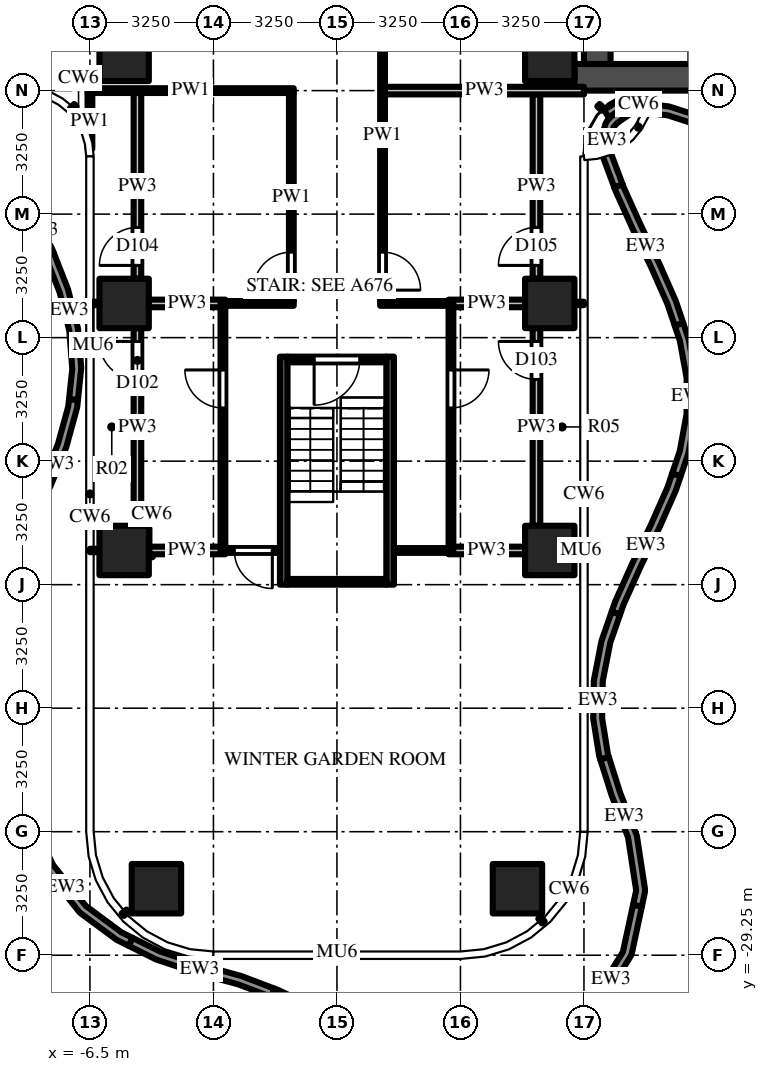
"""IFC4 building model, lengths in metres.
Left out: names, types, materials, properties, quantities, classifications, styles, units other than length and angle.
Written with IfcOpenShell. Run it as: python <this file> out.ifc"""

import sys

from ifc_helpers import new_model, si_unit, direction, frame, frame_2d, origin, origin_2d, place, context, subcontext, project, spatial, polyline, rectangle, outline, extrude, source, transform, mapped, element, fill, save


model = new_model("IFC4")
c1 = context("Model", 3, precision=1e-05, world=origin(), true_north=direction((0.0, 1.0)))
c2 = subcontext(c1, "Body", "Model", "MODEL_VIEW")
j1 = project(units=[si_unit("LENGTHUNIT", "METRE"), si_unit("PLANEANGLEUNIT", "RADIAN")], contexts=[c1])
p1 = place(None, origin())
s1 = spatial("IfcSite", under=j1, at=p1, CompositionType="ELEMENT")
p2 = place(p1, origin())
s2 = spatial("IfcBuilding", under=s1, at=p2, CompositionType="ELEMENT")
p3 = place(p2, frame((0.0, 0.0, 92.5)))
s3 = spatial("IfcBuildingStorey", under=s2, at=p3, CompositionType="ELEMENT", Elevation=92.5)
m1 = source(origin(), c2, "Body", "SweptSolid", [
    extrude(rectangle(XDim=1.3, YDim=1.3, at=origin_2d()), origin(), (0.0, 0.0, 1.0), 5.0),
])
for number, where, z_axis, x_axis in (
    (1, (5.6, -5.6, 0.0), (0.0, 0.0, 1.0), (1.0, 0.0, 0.0)),
    (2, (-5.6, -5.6, 0.0), (0.0, 0.0, 1.0), (1.0, 0.0, 0.0)),
    (3, (5.6, -12.1, 0.0), (0.0, 0.0, 1.0), (1.0, 0.0, 0.0)),
    (4, (5.6, -18.6, 0.0), (0.0, 0.0, 1.0), (1.0, 0.0, 0.0)),
    (5, (4.75, -27.5, 0.0), (0.0, 0.0, 1.0), (1.0, 0.0, 0.0)),
    (6, (-5.6, -12.1, 0.0), (0.0, 0.0, 1.0), (1.0, 0.0, 0.0)),
    (7, (-5.6, -18.6, 0.0), (0.0, 0.0, 1.0), (1.0, 0.0, 0.0)),
    (8, (-4.75, -27.5, 0.0), (0.0, 0.0, 1.0), (1.0, 0.0, 0.0)),
):
    element("IfcColumn", number, at=place(p3, frame(where, z_axis=z_axis, x_axis=x_axis)), inside=s3, PredefinedType="COLUMN", context=c2, shape_type="MappedRepresentation", body=[
        mapped(m1, transform((0.0, 0.0, 0.0))),
    ])
m2 = source(origin(), c2, "Body", "SweptSolid", [
    extrude(rectangle(XDim=16.5, YDim=0.7, at=frame_2d((8.25, 0.0))), origin(), (0.0, 0.0, 1.0), 4.75),
])
p4 = place(p3, frame((6.25, -6.15, 0.0), z_axis=(0.0, 0.0, 1.0), x_axis=(1.0, 0.0, 0.0)))
e9 = element("IfcWall", 9, at=p4, inside=s3, PredefinedType="SHEAR", context=c2, shape_type="MappedRepresentation", body=[
    mapped(m2, transform((0.0, 0.0, 0.0))),
])
m3 = source(origin(), c2, "Body", "SweptSolid", [
    extrude(rectangle(XDim=9.05, YDim=0.7, at=frame_2d((4.525, 0.0))), origin(), (0.0, 0.0, 1.0), 4.75),
])
p5 = place(p3, frame((6.85, -5.8, 0.0), z_axis=(0.0, 0.0, 1.0), x_axis=(0.0, 1.0, 0.0)))
e10 = element("IfcWall", 10, at=p5, inside=s3, PredefinedType="SHEAR", context=c2, shape_type="MappedRepresentation", body=[
    mapped(m3, transform((0.0, 0.0, 0.0))),
])
m4 = source(origin(), c2, "Body", "SweptSolid", [
    extrude(rectangle(XDim=1.8, YDim=2.1, at=frame_2d((0.9, 1.05))), frame((0.0, 0.36, 0.0), z_axis=(0.0, -1.0, 0.0), x_axis=(1.0, 0.0, 0.0)), (0.0, 0.0, 1.0), 0.72),
])
p6 = place(p5, frame((3.15, 0.0, 0.0)))
e11 = element("IfcOpeningElement", 11, at=p6, cuts=e10, PredefinedType="OPENING", context=c2, shape_type="MappedRepresentation", body=[
    mapped(m4, transform((0.0, 0.0, 0.0))),
])
m5 = source(origin(), c2, "Body", "SweptSolid", [
    extrude(rectangle(XDim=6.0, YDim=0.2, at=frame_2d((3.0, 0.0))), origin(), (0.0, 0.0, 1.0), 4.75),
])
for number, where, z_axis, x_axis in (
    (12, (1.4, -13.5, 0.0), (0.0, 0.0, 1.0), (0.0, -1.0, 0.0)),
    (13, (-1.4, -13.5, 0.0), (0.0, 0.0, 1.0), (0.0, -1.0, 0.0)),
):
    element("IfcWall", number, at=place(p3, frame(where, z_axis=z_axis, x_axis=x_axis)), inside=s3, PredefinedType="SHEAR", context=c2, shape_type="MappedRepresentation", body=[
        mapped(m5, transform((0.0, 0.0, 0.0))),
    ])
m6 = source(origin(), c2, "Body", "SweptSolid", [
    extrude(rectangle(XDim=2.6, YDim=0.15, at=frame_2d((1.3, 0.0))), origin(), (0.0, 0.0, 1.0), 4.75),
])
p7 = place(p3, frame((1.3, -13.575, 0.0), z_axis=(0.0, 0.0, 1.0), x_axis=(-1.0, 0.0, 0.0)))
e14 = element("IfcWall", 14, at=p7, inside=s3, PredefinedType="SHEAR", context=c2, shape_type="MappedRepresentation", body=[
    mapped(m6, transform((0.0, 0.0, 0.0))),
])
m7 = source(origin(), c2, "Body", "SweptSolid", [
    extrude(rectangle(XDim=1.2, YDim=2.1, at=frame_2d((0.6, 1.05))), frame((0.0, 0.085, 0.0), z_axis=(0.0, -1.0, 0.0), x_axis=(1.0, 0.0, 0.0)), (0.0, 0.0, 1.0), 0.17),
])
p8 = place(p7, frame((0.7, 0.0, 0.0)))
e15 = element("IfcOpeningElement", 15, at=p8, cuts=e14, PredefinedType="OPENING", context=c2, shape_type="MappedRepresentation", body=[
    mapped(m7, transform((0.0, 0.0, 0.0))),
])
p9 = place(p3, frame((1.3, -19.425, 0.0), z_axis=(0.0, 0.0, 1.0), x_axis=(-1.0, 0.0, 0.0)))
e16 = element("IfcWall", 16, at=p9, inside=s3, PredefinedType="SHEAR", context=c2, shape_type="MappedRepresentation", body=[
    mapped(m6, transform((0.0, 0.0, 0.0))),
])
p10 = place(p3, origin())
e17 = element("IfcWall", 17, at=p10, inside=s3, PredefinedType="PARAPET", context=c2, shape_type="SweptSolid", body=[
    extrude(outline(polyline([(11.142, -8.126), (10.659, -7.894), (9.688, -7.471), (8.714, -7.153), (7.941, -7.061), (7.857, -7.083), (7.72, -6.873), (7.906, -6.828), (7.974, -6.823), (8.741, -6.918), (9.76, -7.247), (10.755, -7.679), (11.244, -7.915), (11.142, -8.126)])), origin(), (0.0, 0.0, 1.0), 1.1),
])
e18 = element("IfcWall", 18, at=p10, inside=s3, PredefinedType="PARAPET", context=c2, shape_type="SweptSolid", body=[
    extrude(outline(polyline([(7.857, -7.083), (7.711, -7.122), (7.388, -7.342), (7.301, -7.435), (7.285, -7.461), (7.243, -7.599), (7.207, -8.036), (7.23, -8.201), (7.518, -8.968), (7.298, -9.05), (6.995, -8.231), (6.972, -8.03), (7.01, -7.566), (7.069, -7.365), (7.111, -7.293), (7.226, -7.171), (7.542, -6.953), (7.154, -7.206), (7.025, -7.009), (7.575, -6.65), (7.704, -6.847), (7.604, -6.912), (7.658, -6.888), (7.72, -6.873), (7.857, -7.083)])), origin(), (0.0, 0.0, 1.0), 1.1),
])
e19 = element("IfcWall", 19, at=p10, inside=s3, PredefinedType="PARAPET", context=c2, shape_type="SweptSolid", body=[
    extrude(outline(polyline([(7.518, -8.968), (7.547, -9.044), (7.992, -10.034), (8.473, -11.031), (8.918, -12.038), (9.111, -12.613), (8.889, -12.687), (8.698, -12.118), (8.259, -11.127), (7.78, -10.135), (7.331, -9.137), (7.298, -9.05), (7.518, -8.968)])), origin(), (0.0, 0.0, 1.0), 1.1),
])
e20 = element("IfcWall", 20, at=p10, inside=s3, PredefinedType="PARAPET", context=c2, shape_type="SweptSolid", body=[
    extrude(outline(polyline([(9.111, -12.613), (9.256, -13.045), (9.436, -14.05), (9.432, -15.048), (9.249, -16.04), (9.043, -16.649), (8.821, -16.574), (9.024, -15.973), (9.199, -15.016), (9.201, -14.06), (9.025, -13.09), (8.889, -12.687), (9.111, -12.613)])), origin(), (0.0, 0.0, 1.0), 1.1),
])
e21 = element("IfcWall", 21, at=p10, inside=s3, PredefinedType="PARAPET", context=c2, shape_type="SweptSolid", body=[
    extrude(outline(polyline([(9.043, -16.649), (8.915, -17.03), (8.482, -18.008), (7.996, -19.015), (7.542, -20.024), (7.45, -20.288), (7.229, -20.211), (7.322, -19.941), (7.782, -18.917), (8.268, -17.912), (8.698, -16.939), (8.821, -16.574), (9.043, -16.649)])), origin(), (0.0, 0.0, 1.0), 1.1),
])
e22 = element("IfcWall", 22, at=p10, inside=s3, PredefinedType="PARAPET", context=c2, shape_type="SweptSolid", body=[
    extrude(outline(polyline([(7.45, -20.288), (7.194, -21.022), (6.995, -22.036), (6.979, -23.019), (7.13, -23.958), (7.154, -24.033), (6.931, -24.103), (6.9, -24.004), (6.744, -23.026), (6.76, -22.021), (6.962, -20.978), (7.229, -20.211), (7.45, -20.288)])), origin(), (0.0, 0.0, 1.0), 1.1),
])
e23 = element("IfcWall", 23, at=p10, inside=s3, PredefinedType="PARAPET", context=c2, shape_type="SweptSolid", body=[
    extrude(outline(polyline([(7.154, -24.033), (7.453, -24.976), (7.892, -26.105), (8.106, -27.505), (8.103, -27.597), (8.022, -27.975), (7.792, -27.925), (7.871, -27.558), (7.872, -27.53), (7.659, -26.146), (7.233, -25.058), (6.931, -24.103), (7.154, -24.033)])), origin(), (0.0, 0.0, 1.0), 1.1),
])
e24 = element("IfcWall", 24, at=p10, inside=s3, PredefinedType="PARAPET", context=c2, shape_type="SweptSolid", body=[
    extrude(outline(polyline([(8.022, -27.975), (7.759, -29.205), (7.738, -29.263), (6.872, -30.653), (6.828, -30.705), (5.927, -31.367), (5.788, -31.178), (6.658, -30.541), (6.678, -30.519), (7.524, -29.166), (7.792, -27.925), (8.022, -27.975)])), origin(), (0.0, 0.0, 1.0), 1.1),
])
e25 = element("IfcWall", 25, at=p10, inside=s3, PredefinedType="PARAPET", context=c2, shape_type="SweptSolid", body=[
    extrude(outline(polyline([(1.931, -31.921), (1.389, -31.759), (0.368, -31.327), (-1.634, -30.383), (-1.729, -30.347), (-1.646, -30.127), (-1.546, -30.165), (0.466, -31.113), (1.459, -31.534), (1.999, -31.698), (1.931, -31.921)])), origin(), (0.0, 0.0, 1.0), 1.1),
])
e26 = element("IfcWall", 26, at=p10, inside=s3, PredefinedType="PARAPET", context=c2, shape_type="SweptSolid", body=[
    extrude(outline(polyline([(-1.729, -30.347), (-2.597, -30.018), (-3.685, -29.72), (-4.758, -29.362), (-5.482, -29.002), (-5.379, -28.793), (-4.656, -29.15), (-3.612, -29.496), (-2.519, -29.796), (-1.646, -30.127), (-1.729, -30.347)])), origin(), (0.0, 0.0, 1.0), 1.1),
])
e27 = element("IfcWall", 27, at=p10, inside=s3, PredefinedType="PARAPET", context=c2, shape_type="SweptSolid", body=[
    extrude(outline(polyline([(-5.482, -29.002), (-5.797, -28.846), (-6.753, -28.139), (-6.781, -28.112), (-7.678, -26.982), (-8.16, -25.985), (-7.948, -25.883), (-7.468, -26.875), (-6.607, -27.953), (-5.66, -28.654), (-5.379, -28.793), (-5.482, -29.002)])), origin(), (0.0, 0.0, 1.0), 1.1),
])
e28 = element("IfcWall", 28, at=p10, inside=s3, PredefinedType="PARAPET", context=c2, shape_type="SweptSolid", body=[
    extrude(outline(polyline([(-8.429, -18.239), (-7.738, -16.78), (-7.341, -15.795), (-7.07, -14.81), (-7.049, -14.615), (-6.815, -14.639), (-6.835, -14.833), (-7.12, -15.877), (-7.524, -16.877), (-8.217, -18.34), (-8.429, -18.239)])), origin(), (0.0, 0.0, 1.0), 1.1),
])
e29 = element("IfcWall", 29, at=p10, inside=s3, PredefinedType="PARAPET", context=c2, shape_type="SweptSolid", body=[
    extrude(outline(polyline([(-7.049, -14.615), (-6.964, -13.82), (-7.044, -12.81), (-7.295, -11.815), (-7.667, -10.863), (-7.449, -10.777), (-7.076, -11.728), (-6.813, -12.762), (-6.729, -13.8), (-6.815, -14.639), (-7.049, -14.615)])), origin(), (0.0, 0.0, 1.0), 1.1),
])
e30 = element("IfcWall", 30, at=p10, inside=s3, PredefinedType="PARAPET", context=c2, shape_type="SweptSolid", body=[
    extrude(outline(polyline([(-7.667, -10.863), (-7.699, -10.782), (-8.24, -9.633), (-8.344, -9.506), (-8.373, -9.486), (-8.528, -9.431), (-8.94, -9.388), (-9.936, -9.145), (-10.512, -8.925), (-10.429, -8.705), (-9.859, -8.923), (-8.892, -9.157), (-8.49, -9.198), (-8.444, -9.209), (-8.263, -9.276), (-8.185, -9.331), (-8.06, -9.478), (-8.034, -9.519), (-7.485, -10.685), (-7.449, -10.777), (-7.667, -10.863)])), origin(), (0.0, 0.0, 1.0), 1.1),
])
m8 = source(origin(), c2, "Body", "SweptSolid", [
    extrude(rectangle(XDim=1.469, YDim=0.125, at=frame_2d((0.734, 0.0))), origin(), (0.0, 0.0, 1.0), 4.75),
])
p11 = place(p3, frame((-6.5, -6.562, 0.0), z_axis=(0.0, 0.0, 1.0), x_axis=(0.0, -1.0, 0.0)))
e31 = element("IfcWall", 31, at=p11, inside=s3, PredefinedType="PARTITIONING", context=c2, shape_type="MappedRepresentation", body=[
    mapped(m8, transform((0.0, 0.0, 0.0))),
])
m9 = source(origin(), c2, "Body", "SweptSolid", [
    extrude(rectangle(XDim=5.2, YDim=0.2, at=frame_2d((2.6, 0.0))), origin(), (0.0, 0.0, 1.0), 4.323),
])
p12 = place(p3, frame((-5.25, -17.95, 0.0), z_axis=(0.0, 0.0, 1.0), x_axis=(0.0, 1.0, 0.0)))
e32 = element("IfcWall", 32, at=p12, inside=s3, PredefinedType="PARTITIONING", context=c2, shape_type="MappedRepresentation", body=[
    mapped(m9, transform((0.0, 0.0, 0.0))),
])
m10 = source(origin(), c2, "Body", "SweptSolid", [
    extrude(rectangle(XDim=1.0, YDim=2.1, at=frame_2d((0.5, 1.05))), frame((0.0, 0.11, 0.0), z_axis=(0.0, -1.0, 0.0), x_axis=(1.0, 0.0, 0.0)), (0.0, 0.0, 1.0), 0.22),
])
p13 = place(p12, frame((3.85, 0.0, 0.0)))
e33 = element("IfcOpeningElement", 33, at=p13, cuts=e32, PredefinedType="OPENING", context=c2, shape_type="MappedRepresentation", body=[
    mapped(m10, transform((0.0, 0.0, 0.0))),
])
m11 = source(origin(), c2, "Body", "SweptSolid", [
    extrude(rectangle(XDim=4.887, YDim=0.2, at=frame_2d((2.444, 0.0))), origin(), (0.0, 0.0, 1.0), 4.046),
])
p14 = place(p3, frame((-5.25, -11.45, 0.0), z_axis=(0.0, 0.0, 1.0), x_axis=(0.0, 1.0, 0.0)))
e34 = element("IfcWall", 34, at=p14, inside=s3, PredefinedType="PARTITIONING", context=c2, shape_type="MappedRepresentation", body=[
    mapped(m11, transform((0.0, 0.0, 0.0))),
])
p15 = place(p14, frame((0.35, 0.0, 0.0)))
e35 = element("IfcOpeningElement", 35, at=p15, cuts=e34, PredefinedType="OPENING", context=c2, shape_type="MappedRepresentation", body=[
    mapped(m10, transform((0.0, 0.0, 0.0))),
])
m12 = source(origin(), c2, "Body", "SweptSolid", [
    extrude(rectangle(XDim=6.3, YDim=0.125, at=frame_2d((3.15, 0.0))), origin(), (0.0, 0.0, 1.0), 3.968),
])
p16 = place(p3, frame((-3.0, -18.5, 0.0), z_axis=(0.0, 0.0, 1.0), x_axis=(0.0, 1.0, 0.0)))
e36 = element("IfcWall", 36, at=p16, inside=s3, PredefinedType="PARTITIONING", context=c2, shape_type="MappedRepresentation", body=[
    mapped(m12, transform((0.0, 0.0, 0.0))),
])
m13 = source(origin(), c2, "Body", "SweptSolid", [
    extrude(rectangle(XDim=1.0, YDim=2.1, at=frame_2d((0.5, 1.05))), frame((0.0, 0.073, 0.0), z_axis=(0.0, -1.0, 0.0), x_axis=(1.0, 0.0, 0.0)), (0.0, 0.0, 1.0), 0.145),
])
p17 = place(p16, frame((3.65, 0.0, 0.0)))
e37 = element("IfcOpeningElement", 37, at=p17, cuts=e36, PredefinedType="OPENING", context=c2, shape_type="MappedRepresentation", body=[
    mapped(m13, transform((0.0, 0.0, 0.0))),
])
m14 = source(origin(), c2, "Body", "SweptSolid", [
    extrude(rectangle(XDim=5.475, YDim=0.125, at=frame_2d((2.738, 0.0))), origin(), (0.0, 0.0, 1.0), 3.968),
])
p18 = place(p3, frame((-1.2, -12.038, 0.0), z_axis=(0.0, 0.0, 1.0), x_axis=(0.0, 1.0, 0.0)))
e38 = element("IfcWall", 38, at=p18, inside=s3, PredefinedType="PARTITIONING", context=c2, shape_type="MappedRepresentation", body=[
    mapped(m14, transform((0.0, 0.0, 0.0))),
])
p19 = place(p18, frame((0.288, 0.0, 0.0)))
e39 = element("IfcOpeningElement", 39, at=p19, cuts=e38, PredefinedType="OPENING", context=c2, shape_type="MappedRepresentation", body=[
    mapped(m13, transform((0.0, 0.0, 0.0))),
])
p20 = place(p3, frame((1.2, -3.312, 0.0), z_axis=(0.0, 0.0, 1.0), x_axis=(0.0, -1.0, 0.0)))
e40 = element("IfcWall", 40, at=p20, inside=s3, PredefinedType="PARTITIONING", context=c2, shape_type="SweptSolid", body=[
    extrude(rectangle(XDim=8.725, YDim=0.125, at=frame_2d((4.363, 0.0))), origin(), (0.0, 0.0, 1.0), 3.968),
])
p21 = place(p20, frame((7.438, 0.0, 0.0)))
e41 = element("IfcOpeningElement", 41, at=p21, cuts=e40, PredefinedType="OPENING", context=c2, shape_type="MappedRepresentation", body=[
    mapped(m13, transform((0.0, 0.0, 0.0))),
])
p22 = place(p3, frame((3.0, -12.2, 0.0), z_axis=(0.0, 0.0, 1.0), x_axis=(0.0, -1.0, 0.0)))
e42 = element("IfcWall", 42, at=p22, inside=s3, PredefinedType="PARTITIONING", context=c2, shape_type="MappedRepresentation", body=[
    mapped(m12, transform((0.0, 0.0, 0.0))),
])
p23 = place(p22, frame((1.65, 0.0, 0.0)))
e43 = element("IfcOpeningElement", 43, at=p23, cuts=e42, PredefinedType="OPENING", context=c2, shape_type="MappedRepresentation", body=[
    mapped(m13, transform((0.0, 0.0, 0.0))),
])
p24 = place(p3, frame((5.25, -17.95, 0.0), z_axis=(0.0, 0.0, 1.0), x_axis=(0.0, 1.0, 0.0)))
e44 = element("IfcWall", 44, at=p24, inside=s3, PredefinedType="PARTITIONING", context=c2, shape_type="MappedRepresentation", body=[
    mapped(m9, transform((0.0, 0.0, 0.0))),
])
p25 = place(p24, frame((3.85, 0.0, 0.0)))
e45 = element("IfcOpeningElement", 45, at=p25, cuts=e44, PredefinedType="OPENING", context=c2, shape_type="MappedRepresentation", body=[
    mapped(m10, transform((0.0, 0.0, 0.0))),
])
m15 = source(origin(), c2, "Body", "SweptSolid", [
    extrude(rectangle(XDim=4.85, YDim=0.2, at=frame_2d((2.425, 0.0))), origin(), (0.0, 0.0, 1.0), 4.046),
])
p26 = place(p3, frame((5.25, -11.45, 0.0), z_axis=(0.0, 0.0, 1.0), x_axis=(0.0, 1.0, 0.0)))
e46 = element("IfcWall", 46, at=p26, inside=s3, PredefinedType="PARTITIONING", context=c2, shape_type="MappedRepresentation", body=[
    mapped(m15, transform((0.0, 0.0, 0.0))),
])
p27 = place(p26, frame((0.35, 0.0, 0.0)))
e47 = element("IfcOpeningElement", 47, at=p27, cuts=e46, PredefinedType="OPENING", context=c2, shape_type="MappedRepresentation", body=[
    mapped(m10, transform((0.0, 0.0, 0.0))),
])
m16 = source(origin(), c2, "Body", "SweptSolid", [
    extrude(rectangle(XDim=2.012, YDim=0.2, at=frame_2d((1.006, 0.0))), origin(), (0.0, 0.0, 1.0), 4.197),
])
for number, where, z_axis, x_axis in (
    (48, (-4.95, -18.6, 0.0), (0.0, 0.0, 1.0), (1.0, 0.0, 0.0)),
    (49, (2.938, -18.6, 0.0), (0.0, 0.0, 1.0), (1.0, 0.0, 0.0)),
):
    element("IfcWall", number, at=place(p3, frame(where, z_axis=z_axis, x_axis=x_axis)), inside=s3, PredefinedType="PARTITIONING", context=c2, shape_type="MappedRepresentation", body=[
        mapped(m16, transform((0.0, 0.0, 0.0))),
    ])
m17 = source(origin(), c2, "Body", "SweptSolid", [
    extrude(rectangle(XDim=1.562, YDim=0.125, at=frame_2d((0.781, 0.0))), origin(), (0.0, 0.0, 1.0), 4.197),
])
p28 = place(p3, frame((-1.5, -18.6, 0.0), z_axis=(0.0, 0.0, 1.0), x_axis=(-1.0, 0.0, 0.0)))
e50 = element("IfcWall", 50, at=p28, inside=s3, PredefinedType="PARTITIONING", context=c2, shape_type="MappedRepresentation", body=[
    mapped(m17, transform((0.0, 0.0, 0.0))),
])
p29 = place(p28, frame((0.2, 0.0, 0.0)))
e51 = element("IfcOpeningElement", 51, at=p29, cuts=e50, PredefinedType="OPENING", context=c2, shape_type="MappedRepresentation", body=[
    mapped(m13, transform((0.0, 0.0, 0.0))),
])
p30 = place(p3, frame((3.062, -18.6, 0.0), z_axis=(0.0, 0.0, 1.0), x_axis=(-1.0, 0.0, 0.0)))
e52 = element("IfcWall", 52, at=p30, inside=s3, PredefinedType="PARTITIONING", context=c2, shape_type="MappedRepresentation", body=[
    mapped(m17, transform((0.0, 0.0, 0.0))),
])
m18 = source(origin(), c2, "Body", "SweptSolid", [
    extrude(rectangle(XDim=2.012, YDim=0.2, at=frame_2d((1.006, 0.0))), origin(), (0.0, 0.0, 1.0), 3.968),
])
for number, where, z_axis, x_axis in (
    (53, (-4.95, -12.1, 0.0), (0.0, 0.0, 1.0), (1.0, 0.0, 0.0)),
    (54, (2.938, -12.1, 0.0), (0.0, 0.0, 1.0), (1.0, 0.0, 0.0)),
):
    element("IfcWall", number, at=place(p3, frame(where, z_axis=z_axis, x_axis=x_axis)), inside=s3, PredefinedType="PARTITIONING", context=c2, shape_type="MappedRepresentation", body=[
        mapped(m18, transform((0.0, 0.0, 0.0))),
    ])
m19 = source(origin(), c2, "Body", "SweptSolid", [
    extrude(rectangle(XDim=1.925, YDim=0.125, at=frame_2d((0.962, 0.0))), origin(), (0.0, 0.0, 1.0), 3.968),
])
for number, where, z_axis, x_axis in (
    (55, (-3.062, -12.1, 0.0), (0.0, 0.0, 1.0), (1.0, 0.0, 0.0)),
    (56, (1.137, -12.1, 0.0), (0.0, 0.0, 1.0), (1.0, 0.0, 0.0)),
):
    element("IfcWall", number, at=place(p3, frame(where, z_axis=z_axis, x_axis=x_axis)), inside=s3, PredefinedType="PARTITIONING", context=c2, shape_type="MappedRepresentation", body=[
        mapped(m19, transform((0.0, 0.0, 0.0))),
    ])
p31 = place(p3, frame((1.262, -6.5, 0.0), z_axis=(0.0, 0.0, 1.0), x_axis=(1.0, 0.0, 0.0)))
e57 = element("IfcWall", 57, at=p31, inside=s3, PredefinedType="PARTITIONING", context=c2, shape_type="SweptSolid", body=[
    extrude(rectangle(XDim=5.238, YDim=0.2, at=frame_2d((2.619, 0.0))), origin(), (0.0, 0.0, 1.0), 4.23),
])
m20 = source(origin(), c2, "Body", "SweptSolid", [
    extrude(rectangle(XDim=5.425, YDim=0.125, at=frame_2d((2.712, 0.0))), origin(), (0.0, 0.0, 1.0), 4.23),
])
p32 = place(p3, frame((-1.137, -6.5, 0.0), z_axis=(0.0, 0.0, 1.0), x_axis=(-1.0, 0.0, 0.0)))
e58 = element("IfcWall", 58, at=p32, inside=s3, PredefinedType="PARTITIONING", context=c2, shape_type="MappedRepresentation", body=[
    mapped(m20, transform((0.0, 0.0, 0.0))),
])
m21 = source(origin(), c2, "Body", "SweptSolid", [
    extrude(rectangle(XDim=1.2, YDim=2.1, at=frame_2d((0.6, 1.05))), frame((0.0, 0.025, 0.0), z_axis=(0.0, -1.0, 0.0), x_axis=(1.0, 0.0, 0.0)), (0.0, 0.0, 1.0), 0.05),
])
p33 = place(p8, origin())
e59 = element("IfcDoor", 59, at=p33, inside=s3, OperationType="SINGLE_SWING_RIGHT", PredefinedType="DOOR", context=c2, shape_type="MappedRepresentation", body=[
    mapped(m21, transform((0.0, 0.0, 0.0))),
])
fill(e15, e59)
m22 = source(origin(), c2, "Body", "SweptSolid", [
    extrude(rectangle(XDim=1.0, YDim=2.1, at=frame_2d((0.5, 1.05))), frame((0.0, 0.025, 0.0), z_axis=(0.0, -1.0, 0.0), x_axis=(1.0, 0.0, 0.0)), (0.0, 0.0, 1.0), 0.05),
])
p34 = place(p29, origin())
e60 = element("IfcDoor", 60, at=p34, inside=s3, OperationType="SINGLE_SWING_LEFT", PredefinedType="DOOR", context=c2, shape_type="MappedRepresentation", body=[
    mapped(m22, transform((0.0, 0.0, 0.0))),
])
fill(e51, e60)
p35 = place(p17, origin())
e61 = element("IfcDoor", 61, at=p35, inside=s3, OperationType="SINGLE_SWING_RIGHT", PredefinedType="DOOR", context=c2, shape_type="MappedRepresentation", body=[
    mapped(m22, transform((0.0, 0.0, 0.0))),
])
fill(e37, e61)
p36 = place(p23, origin())
e62 = element("IfcDoor", 62, at=p36, inside=s3, OperationType="SINGLE_SWING_LEFT", PredefinedType="DOOR", context=c2, shape_type="MappedRepresentation", body=[
    mapped(m22, transform((0.0, 0.0, 0.0))),
])
fill(e43, e62)
p37 = place(p13, origin())
e63 = element("IfcDoor", 63, at=p37, inside=s3, OperationType="SINGLE_SWING_RIGHT", PredefinedType="DOOR", context=c2, shape_type="MappedRepresentation", body=[
    mapped(m22, transform((0.0, 0.0, 0.0))),
])
fill(e33, e63)
p38 = place(p25, origin())
e64 = element("IfcDoor", 64, at=p38, inside=s3, OperationType="SINGLE_SWING_RIGHT", PredefinedType="DOOR", context=c2, shape_type="MappedRepresentation", body=[
    mapped(m22, transform((0.0, 0.0, 0.0))),
])
fill(e45, e64)
p39 = place(p19, origin())
e65 = element("IfcDoor", 65, at=p39, inside=s3, OperationType="SINGLE_SWING_LEFT", PredefinedType="DOOR", context=c2, shape_type="MappedRepresentation", body=[
    mapped(m22, transform((0.0, 0.0, 0.0))),
])
fill(e39, e65)
p40 = place(p21, origin())
e66 = element("IfcDoor", 66, at=p40, inside=s3, OperationType="SINGLE_SWING_RIGHT", PredefinedType="DOOR", context=c2, shape_type="MappedRepresentation", body=[
    mapped(m22, transform((0.0, 0.0, 0.0))),
])
fill(e41, e66)
p41 = place(p15, origin())
e67 = element("IfcDoor", 67, at=p41, inside=s3, OperationType="SINGLE_SWING_LEFT", PredefinedType="DOOR", context=c2, shape_type="MappedRepresentation", body=[
    mapped(m22, transform((0.0, 0.0, 0.0))),
])
fill(e35, e67)
p42 = place(p27, origin())
e68 = element("IfcDoor", 68, at=p42, inside=s3, OperationType="SINGLE_SWING_LEFT", PredefinedType="DOOR", context=c2, shape_type="MappedRepresentation", body=[
    mapped(m22, transform((0.0, 0.0, 0.0))),
])
fill(e47, e68)
save(model, sys.argv[1])
